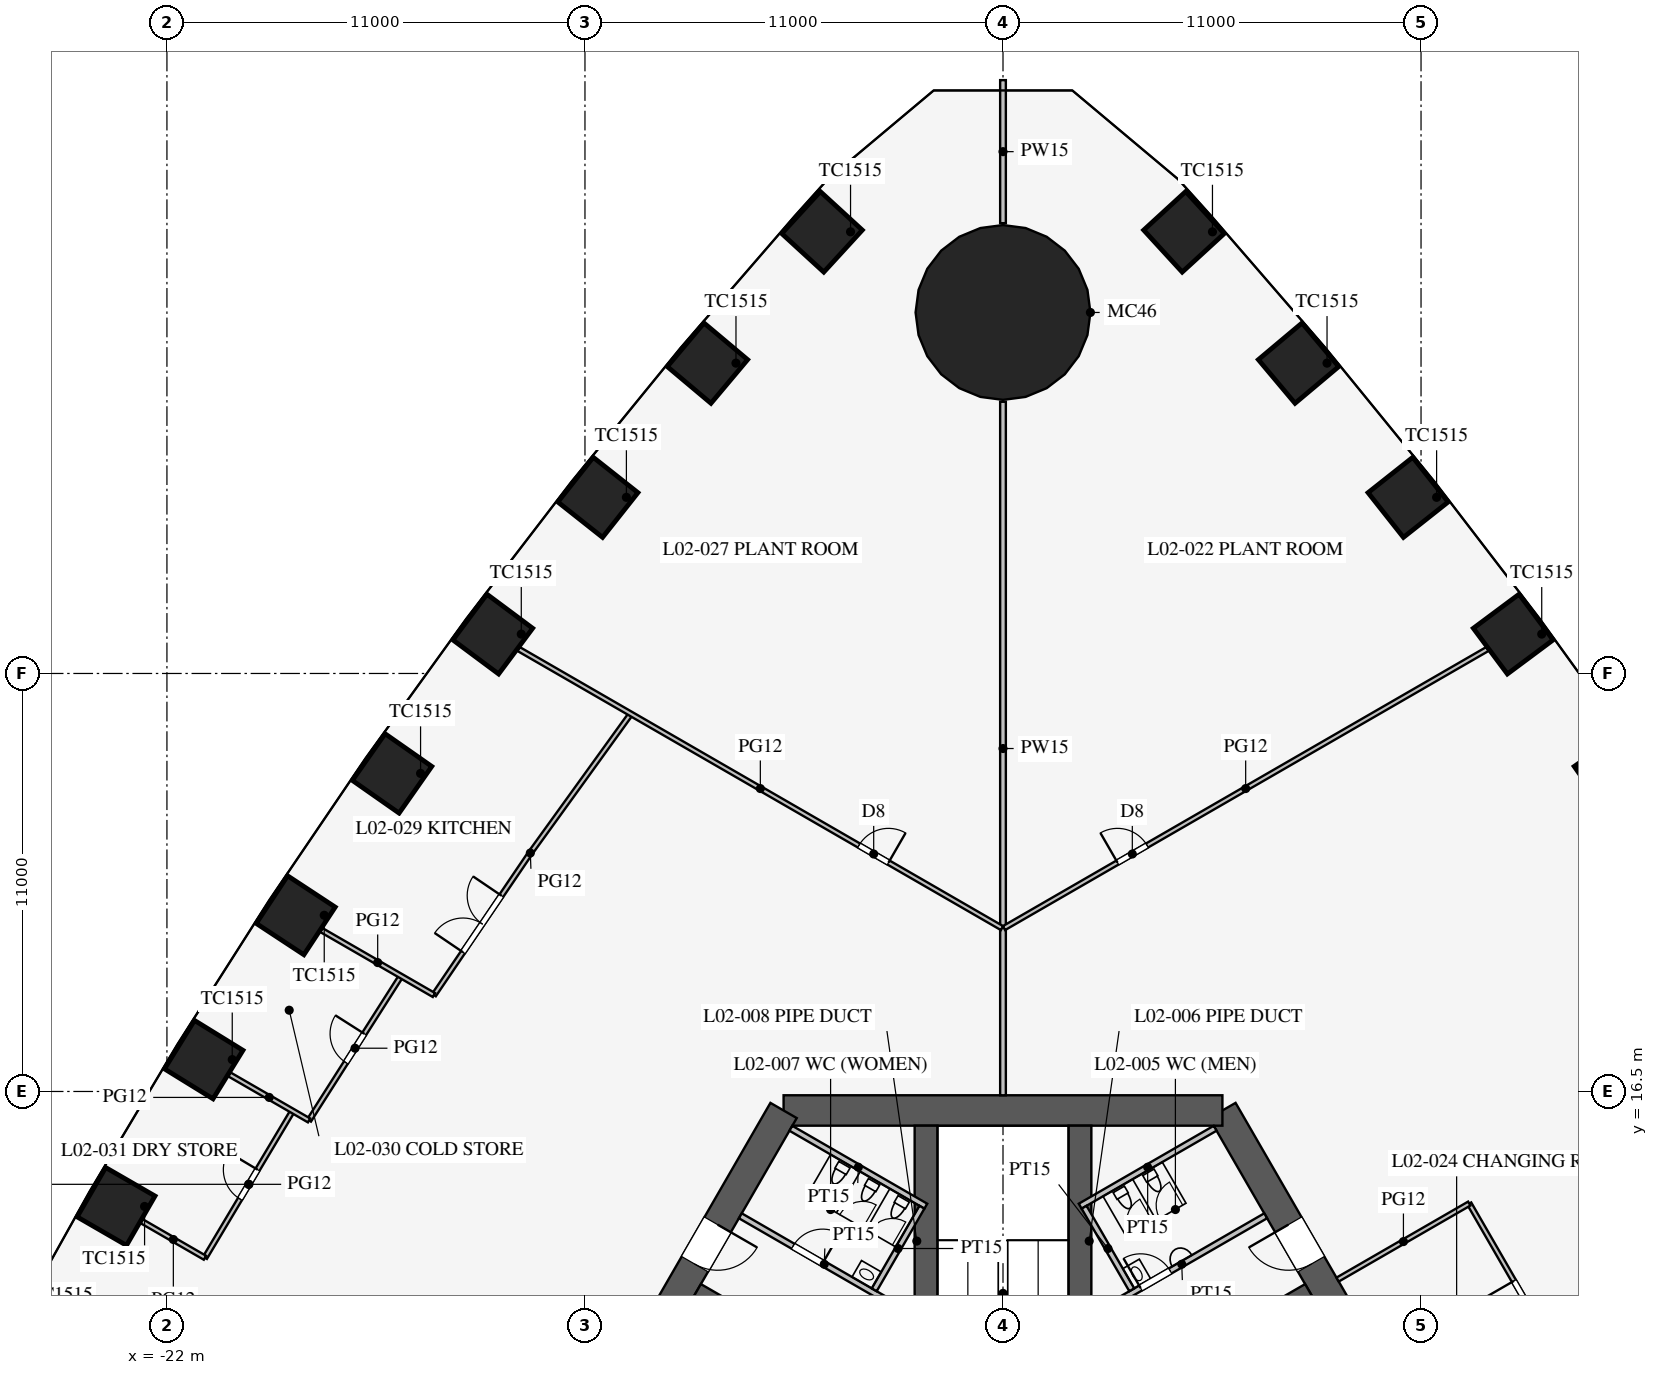
"""IFC4 building model, lengths in metres.
Left out: names, types, materials, properties, quantities, classifications, styles, units other than length and angle.
Written with IfcOpenShell. Run it as: python <this file> out.ifc"""

import sys

from ifc_helpers import new_model, si_unit, direction, frame, frame_2d, origin, origin_2d, place, context, subcontext, project, spatial, rectangle, circle, extrude, element, fill, save


model = new_model("IFC4")
c1 = context("Model", 3, precision=1e-05, world=origin(), true_north=direction((0.0, 1.0)))
c2 = subcontext(c1, "Body", "Model", "MODEL_VIEW")
j1 = project(units=[si_unit("LENGTHUNIT", "METRE"), si_unit("PLANEANGLEUNIT", "RADIAN")], contexts=[c1])
p1 = place(None, origin())
s1 = spatial("IfcSite", under=j1, at=p1, CompositionType="ELEMENT")
p2 = place(p1, origin())
s2 = spatial("IfcBuilding", under=s1, at=p2, CompositionType="ELEMENT")
p3 = place(p2, frame((0.0, 0.0, 11.5)))
s3 = spatial("IfcBuildingStorey", under=s2, at=p3, CompositionType="ELEMENT", Elevation=11.5)
for number, where, z_axis, x_axis in (
    (1, (16.076, 24.87, 0.0), (0.0, 0.0, 1.0), (-0.574, 0.819, 0.0)),
    (2, (13.426, 28.536, 0.0), (0.0, 0.0, 1.0), (-0.597, 0.802, 0.0)),
    (3, (10.66, 32.135, 0.0), (0.0, 0.0, 1.0), (-0.62, 0.784, 0.0)),
    (4, (7.776, 35.667, 0.0), (0.0, 0.0, 1.0), (-0.643, 0.766, 0.0)),
    (5, (4.762, 39.122, 0.0), (0.0, 0.0, 1.0), (-0.676, 0.737, 0.0)),
    (6, (-4.762, 39.122, 0.0), (0.0, 0.0, 1.0), (-0.676, -0.737, 0.0)),
    (7, (-7.776, 35.667, 0.0), (0.0, 0.0, 1.0), (-0.643, -0.766, 0.0)),
    (8, (-10.66, 32.135, 0.0), (0.0, 0.0, 1.0), (-0.62, -0.784, 0.0)),
    (9, (-13.426, 28.536, 0.0), (0.0, 0.0, 1.0), (-0.597, -0.802, 0.0)),
    (10, (-16.076, 24.87, 0.0), (0.0, 0.0, 1.0), (-0.574, -0.819, 0.0)),
    (11, (-18.611, 21.137, 0.0), (0.0, 0.0, 1.0), (-0.549, -0.836, 0.0)),
    (12, (-21.031, 17.339, 0.0), (0.0, 0.0, 1.0), (-0.525, -0.851, 0.0)),
    (13, (-23.338, 13.474, 0.0), (0.0, 0.0, 1.0), (-0.5, -0.866, 0.0)),
):
    element("IfcColumn", number, at=place(p3, frame(where, z_axis=z_axis, x_axis=x_axis)), inside=s3, PredefinedType="COLUMN", context=c2, shape_type="SweptSolid", body=[
        extrude(rectangle(XDim=1.5, YDim=1.5, at=origin_2d()), origin(), (0.0, 0.0, 1.0), 5.0),
    ])
p4 = place(p3, frame((0.0, 37.0, 0.0), z_axis=(0.0, 0.0, 1.0), x_axis=(1.0, 0.0, 0.0)))
e14 = element("IfcColumn", 14, at=p4, inside=s3, PredefinedType="COLUMN", context=c2, shape_type="SweptSolid", body=[
    extrude(circle(Radius=2.3, at=origin_2d()), origin(), (0.0, 0.0, 1.0), 5.0),
])
p5 = place(p3, frame((16.743, -3.0, 0.0), z_axis=(0.0, 0.0, 1.0), x_axis=(-0.500002442456, 0.866023993627, 0.0)))
e15 = element("IfcWall", 15, at=p5, inside=s3, PredefinedType="SHEAR", context=c2, shape_type="SweptSolid", body=[
    extrude(rectangle(XDim=21.939, YDim=0.8, at=frame_2d((10.97, 0.0))), origin(), (0.0, 0.0, 1.0), 5.0),
])
p6 = place(p5, frame((17.27, 0.0, 0.0)))
e16 = element("IfcOpeningElement", 16, at=p6, cuts=e15, PredefinedType="OPENING", context=c2, shape_type="SweptSolid", body=[
    extrude(rectangle(XDim=1.2, YDim=2.1, at=frame_2d((0.6, 1.05))), frame((0.0, 0.41, 0.0), z_axis=(0.0, -1.0, 0.0), x_axis=(1.0, 0.0, 0.0)), (0.0, 0.0, 1.0), 0.82),
])
p7 = place(p5, frame((3.47, 0.0, 0.0)))
e17 = element("IfcOpeningElement", 17, at=p7, cuts=e15, PredefinedType="OPENING", context=c2, shape_type="SweptSolid", body=[
    extrude(rectangle(XDim=1.2, YDim=2.1, at=frame_2d((0.6, 1.05))), frame((0.0, 0.41, 0.0), z_axis=(0.0, -1.0, 0.0), x_axis=(1.0, 0.0, 0.0)), (0.0, 0.0, 1.0), 0.82),
])
p8 = place(p3, frame((5.773, 16.0, 0.0), z_axis=(0.0, 0.0, 1.0), x_axis=(-1.0, 0.0, 0.0)))
e18 = element("IfcWall", 18, at=p8, inside=s3, PredefinedType="SHEAR", context=c2, shape_type="SweptSolid", body=[
    extrude(rectangle(XDim=11.547, YDim=0.8, at=frame_2d((5.773, 0.0))), origin(), (0.0, 0.0, 1.0), 5.0),
])
p9 = place(p3, frame((-5.773, 16.0, 0.0), z_axis=(0.0, 0.0, 1.0), x_axis=(-0.500002442456, -0.866023993627, 0.0)))
e19 = element("IfcWall", 19, at=p9, inside=s3, PredefinedType="SHEAR", context=c2, shape_type="SweptSolid", body=[
    extrude(rectangle(XDim=21.939, YDim=0.8, at=frame_2d((10.97, 0.0))), origin(), (0.0, 0.0, 1.0), 5.0),
])
p10 = place(p9, frame((17.27, 0.0, 0.0)))
e20 = element("IfcOpeningElement", 20, at=p10, cuts=e19, PredefinedType="OPENING", context=c2, shape_type="SweptSolid", body=[
    extrude(rectangle(XDim=1.2, YDim=2.1, at=frame_2d((0.6, 1.05))), frame((0.0, 0.41, 0.0), z_axis=(0.0, -1.0, 0.0), x_axis=(1.0, 0.0, 0.0)), (0.0, 0.0, 1.0), 0.82),
])
p11 = place(p9, frame((3.47, 0.0, 0.0)))
e21 = element("IfcOpeningElement", 21, at=p11, cuts=e19, PredefinedType="OPENING", context=c2, shape_type="SweptSolid", body=[
    extrude(rectangle(XDim=1.2, YDim=2.1, at=frame_2d((0.6, 1.05))), frame((0.0, 0.41, 0.0), z_axis=(0.0, -1.0, 0.0), x_axis=(1.0, 0.0, 0.0)), (0.0, 0.0, 1.0), 0.82),
])
for number, where, z_axis, x_axis in (
    (22, (5.832, 9.949, 0.0), (0.0, 0.0, 1.0), (0.866, 0.5, 0.0)),
    (23, (-5.832, 9.949, 0.0), (0.0, 0.0, 1.0), (-0.866, 0.5, 0.0)),
):
    element("IfcWall", number, at=place(p3, frame(where, z_axis=z_axis, x_axis=x_axis)), inside=s3, PredefinedType="SHEAR", context=c2, shape_type="SweptSolid", body=[
        extrude(rectangle(XDim=2.575, YDim=0.45, at=frame_2d((1.288, 0.0))), origin(), (0.0, 0.0, 1.0), 5.0),
    ])
for number, where, z_axis, x_axis in (
    (24, (2.025, 6.525, 0.0), (0.0, 0.0, 1.0), (0.0, 1.0, 0.0)),
    (25, (-2.025, 6.525, 0.0), (0.0, 0.0, 1.0), (0.0, 1.0, 0.0)),
):
    element("IfcWall", number, at=place(p3, frame(where, z_axis=z_axis, x_axis=x_axis)), inside=s3, PredefinedType="SHEAR", context=c2, shape_type="SweptSolid", body=[
        extrude(rectangle(XDim=9.075, YDim=0.6, at=frame_2d((4.538, 0.0))), origin(), (0.0, 0.0, 1.0), 5.0),
    ])
p12 = place(p3, frame((2.495, 10.678, 0.0), z_axis=(0.0, 0.0, 1.0), x_axis=(0.86602216432, 0.500005610874, 0.0)))
e26 = element("IfcWall", 26, at=p12, inside=s3, PredefinedType="PARTITIONING", context=c2, shape_type="SweptSolid", body=[
    extrude(rectangle(XDim=5.1, YDim=0.15, at=frame_2d((2.55, 0.0))), origin(), (0.0, 0.0, 1.0), 4.8),
])
p13 = place(p12, frame((1.3, 0.0, 0.0)))
e27 = element("IfcOpeningElement", 27, at=p13, cuts=e26, PredefinedType="OPENING", context=c2, shape_type="SweptSolid", body=[
    extrude(rectangle(XDim=0.9, YDim=2.1, at=frame_2d((0.45, 1.05))), frame((0.0, 0.085, 0.0), z_axis=(0.0, -1.0, 0.0), x_axis=(1.0, 0.0, 0.0)), (0.0, 0.0, 1.0), 0.17),
])
p14 = place(p3, frame((-2.495, 10.678, 0.0), z_axis=(0.0, 0.0, 1.0), x_axis=(-0.86602216432, 0.500005610874, 0.0)))
e28 = element("IfcWall", 28, at=p14, inside=s3, PredefinedType="PARTITIONING", context=c2, shape_type="SweptSolid", body=[
    extrude(rectangle(XDim=5.1, YDim=0.15, at=frame_2d((2.55, 0.0))), origin(), (0.0, 0.0, 1.0), 4.8),
])
p15 = place(p14, frame((2.6, 0.0, 0.0)))
e29 = element("IfcOpeningElement", 29, at=p15, cuts=e28, PredefinedType="OPENING", context=c2, shape_type="SweptSolid", body=[
    extrude(rectangle(XDim=0.9, YDim=2.1, at=frame_2d((0.45, 1.05))), frame((0.0, 0.085, 0.0), z_axis=(0.0, -1.0, 0.0), x_axis=(1.0, 0.0, 0.0)), (0.0, 0.0, 1.0), 0.17),
])
p16 = place(p3, frame((2.031, 13.482, 0.0), z_axis=(0.0, 0.0, 1.0), x_axis=(0.866050731258, 0.499956128963, 0.0)))
e30 = element("IfcWall", 30, at=p16, inside=s3, PredefinedType="PARTITIONING", context=c2, shape_type="SweptSolid", body=[
    extrude(rectangle(XDim=4.1, YDim=0.15, at=frame_2d((2.05, 0.0))), origin(), (0.0, 0.0, 1.0), 4.8),
])
p17 = place(p3, frame((3.389, 11.281, 0.0), z_axis=(0.0, 0.0, 1.0), x_axis=(-0.499989096993, 0.866031698547, 0.0)))
e31 = element("IfcWall", 31, at=p17, inside=s3, PredefinedType="PARTITIONING", context=c2, shape_type="SweptSolid", body=[
    extrude(rectangle(XDim=2.51, YDim=0.15, at=frame_2d((1.255, 0.0))), origin(), (0.0, 0.0, 1.0), 4.8),
])
p18 = place(p3, frame((-2.031, 13.482, 0.0), z_axis=(0.0, 0.0, 1.0), x_axis=(-0.866050731258, 0.499956128963, 0.0)))
e32 = element("IfcWall", 32, at=p18, inside=s3, PredefinedType="PARTITIONING", context=c2, shape_type="SweptSolid", body=[
    extrude(rectangle(XDim=4.1, YDim=0.15, at=frame_2d((2.05, 0.0))), origin(), (0.0, 0.0, 1.0), 4.8),
])
p19 = place(p3, frame((-3.389, 11.281, 0.0), z_axis=(0.0, 0.0, 1.0), x_axis=(0.499989096993, 0.866031698547, 0.0)))
e33 = element("IfcWall", 33, at=p19, inside=s3, PredefinedType="PARTITIONING", context=c2, shape_type="SweptSolid", body=[
    extrude(rectangle(XDim=2.51, YDim=0.15, at=frame_2d((1.255, 0.0))), origin(), (0.0, 0.0, 1.0), 4.8),
])
p20 = place(p3, frame((0.0, 16.4, 0.0), z_axis=(0.0, 0.0, 1.0), x_axis=(0.0, 1.0, 0.0)))
e34 = element("IfcWall", 34, at=p20, inside=s3, PredefinedType="PARTITIONING", context=c2, shape_type="SweptSolid", body=[
    extrude(rectangle(XDim=18.25, YDim=0.15, at=frame_2d((9.125, 0.0))), origin(), (0.0, 0.0, 1.0), 3.1),
])
p21 = place(p3, frame((0.0, 39.35, 0.0), z_axis=(0.0, 0.0, 1.0), x_axis=(0.0, 1.0, 0.0)))
e35 = element("IfcWall", 35, at=p21, inside=s3, PredefinedType="PARTITIONING", context=c2, shape_type="SweptSolid", body=[
    extrude(rectangle(XDim=3.764, YDim=0.15, at=frame_2d((1.882, 0.0))), origin(), (0.0, 0.0, 1.0), 3.1),
])
p22 = place(p3, frame((15.069, 8.7, 0.0), z_axis=(0.0, 0.0, 1.0), x_axis=(-0.49999793692, 0.866026594901, 0.0)))
e36 = element("IfcWall", 36, at=p22, inside=s3, PredefinedType="PARTITIONING", context=c2, shape_type="SweptSolid", body=[
    extrude(rectangle(XDim=5.6, YDim=0.12, at=frame_2d((2.8, 0.0))), origin(), (0.0, 0.0, 1.0), 3.6),
])
p23 = place(p22, frame((2.35, 0.0, 0.0)))
e37 = element("IfcOpeningElement", 37, at=p23, cuts=e36, PredefinedType="OPENING", context=c2, shape_type="SweptSolid", body=[
    extrude(rectangle(XDim=0.9, YDim=2.1, at=frame_2d((0.45, 1.05))), frame((0.0, 0.07, 0.0), z_axis=(0.0, -1.0, 0.0), x_axis=(1.0, 0.0, 0.0)), (0.0, 0.0, 1.0), 0.14),
])
p24 = place(p3, frame((8.805, 11.55, 0.0), z_axis=(0.0, 0.0, 1.0), x_axis=(0.866026010844, 0.49999894854, 0.0)))
e38 = element("IfcWall", 38, at=p24, inside=s3, PredefinedType="PARTITIONING", context=c2, shape_type="SweptSolid", body=[
    extrude(rectangle(XDim=4.0, YDim=0.12, at=frame_2d((2.0, 0.0))), origin(), (0.0, 0.0, 1.0), 3.6),
])
p25 = place(p3, frame((0.025, 20.799, 0.0), z_axis=(0.0, 0.0, 1.0), x_axis=(0.866027263711, 0.4999967785, 0.0)))
e39 = element("IfcWall", 39, at=p25, inside=s3, PredefinedType="PARTITIONING", context=c2, shape_type="SweptSolid", body=[
    extrude(rectangle(XDim=14.688, YDim=0.12, at=frame_2d((7.344, 0.0))), origin(), (0.0, 0.0, 1.0), 3.6),
])
p26 = place(p25, frame((3.45, 0.0, 0.0)))
e40 = element("IfcOpeningElement", 40, at=p26, cuts=e39, PredefinedType="OPENING", context=c2, shape_type="SweptSolid", body=[
    extrude(rectangle(XDim=0.9, YDim=2.1, at=frame_2d((0.45, 1.05))), frame((0.0, 0.07, 0.0), z_axis=(0.0, -1.0, 0.0), x_axis=(1.0, 0.0, 0.0)), (0.0, 0.0, 1.0), 0.14),
])
p27 = place(p3, frame((-12.441, 22.771, 0.0), z_axis=(0.0, 0.0, 1.0), x_axis=(-0.561512004239, -0.827468591002, 0.0)))
e41 = element("IfcWall", 41, at=p27, inside=s3, PredefinedType="PARTITIONING", context=c2, shape_type="SweptSolid", body=[
    extrude(rectangle(XDim=4.512, YDim=0.12, at=frame_2d((2.256, 0.0))), origin(), (0.0, 0.0, 1.0), 3.6),
])
p28 = place(p27, frame((1.35, 0.0, 0.0)))
e42 = element("IfcOpeningElement", 42, at=p28, cuts=e41, PredefinedType="OPENING", context=c2, shape_type="SweptSolid", body=[
    extrude(rectangle(XDim=1.8, YDim=2.1, at=frame_2d((0.9, 1.05))), frame((0.0, 0.07, 0.0), z_axis=(0.0, -1.0, 0.0), x_axis=(1.0, 0.0, 0.0)), (0.0, 0.0, 1.0), 0.14),
])
p29 = place(p3, frame((-9.793, 26.439, 0.0), z_axis=(0.0, 0.0, 1.0), x_axis=(-0.585376255171, -0.810761765183, 0.0)))
e43 = element("IfcWall", 43, at=p29, inside=s3, PredefinedType="PARTITIONING", context=c2, shape_type="SweptSolid", body=[
    extrude(rectangle(XDim=4.523, YDim=0.12, at=frame_2d((2.262, 0.0))), origin(), (0.0, 0.0, 1.0), 3.6),
])
p30 = place(p3, frame((-18.693, 15.989, 0.0), z_axis=(0.0, 0.0, 1.0), x_axis=(-0.51252396108, -0.858672923364, 0.0)))
e44 = element("IfcWall", 44, at=p30, inside=s3, PredefinedType="PARTITIONING", context=c2, shape_type="SweptSolid", body=[
    extrude(rectangle(XDim=4.5, YDim=0.12, at=frame_2d((2.25, 0.0))), origin(), (0.0, 0.0, 1.0), 3.6),
])
p31 = place(p30, frame((1.8, 0.0, 0.0)))
e45 = element("IfcOpeningElement", 45, at=p31, cuts=e44, PredefinedType="OPENING", context=c2, shape_type="SweptSolid", body=[
    extrude(rectangle(XDim=0.9, YDim=2.1, at=frame_2d((0.45, 1.05))), frame((0.0, 0.07, 0.0), z_axis=(0.0, -1.0, 0.0), x_axis=(1.0, 0.0, 0.0)), (0.0, 0.0, 1.0), 0.14),
])
p32 = place(p3, frame((-15.841, 19.538, 0.0), z_axis=(0.0, 0.0, 1.0), x_axis=(-0.537243691336, -0.843427066272, 0.0)))
e46 = element("IfcWall", 46, at=p32, inside=s3, PredefinedType="PARTITIONING", context=c2, shape_type="SweptSolid", body=[
    extrude(rectangle(XDim=4.504, YDim=0.12, at=frame_2d((2.252, 0.0))), origin(), (0.0, 0.0, 1.0), 3.6),
])
p33 = place(p32, frame((1.8, 0.0, 0.0)))
e47 = element("IfcOpeningElement", 47, at=p33, cuts=e46, PredefinedType="OPENING", context=c2, shape_type="SweptSolid", body=[
    extrude(rectangle(XDim=0.9, YDim=2.1, at=frame_2d((0.45, 1.05))), frame((0.0, 0.07, 0.0), z_axis=(0.0, -1.0, 0.0), x_axis=(1.0, 0.0, 0.0)), (0.0, 0.0, 1.0), 0.14),
])
p34 = place(p3, frame((-21.0, 12.124, 0.0), z_axis=(0.0, 0.0, 1.0), x_axis=(-0.865988661894, 0.500063633421, 0.0)))
e48 = element("IfcWall", 48, at=p34, inside=s3, PredefinedType="PARTITIONING", context=c2, shape_type="SweptSolid", body=[
    extrude(rectangle(XDim=1.92, YDim=0.12, at=frame_2d((0.96, 0.0))), origin(), (0.0, 0.0, 1.0), 3.6),
])
p35 = place(p3, frame((-0.025, 20.799, 0.0), z_axis=(0.0, 0.0, 1.0), x_axis=(-0.866027263711, 0.4999967785, 0.0)))
e49 = element("IfcWall", 49, at=p35, inside=s3, PredefinedType="PARTITIONING", context=c2, shape_type="SweptSolid", body=[
    extrude(rectangle(XDim=14.688, YDim=0.12, at=frame_2d((7.344, 0.0))), origin(), (0.0, 0.0, 1.0), 3.6),
])
p36 = place(p35, frame((3.45, 0.0, 0.0)))
e50 = element("IfcOpeningElement", 50, at=p36, cuts=e49, PredefinedType="OPENING", context=c2, shape_type="SweptSolid", body=[
    extrude(rectangle(XDim=0.9, YDim=2.1, at=frame_2d((0.45, 1.05))), frame((0.0, 0.07, 0.0), z_axis=(0.0, -1.0, 0.0), x_axis=(1.0, 0.0, 0.0)), (0.0, 0.0, 1.0), 0.14),
])
p37 = place(p3, frame((-18.26, 15.739, 0.0), z_axis=(0.0, 0.0, 1.0), x_axis=(-0.866017538894, 0.500013622142, 0.0)))
e51 = element("IfcWall", 51, at=p37, inside=s3, PredefinedType="PARTITIONING", context=c2, shape_type="SweptSolid", body=[
    extrude(rectangle(XDim=2.419, YDim=0.12, at=frame_2d((1.21, 0.0))), origin(), (0.0, 0.0, 1.0), 3.6),
])
p38 = place(p3, frame((-14.975, 19.038, 0.0), z_axis=(0.0, 0.0, 1.0), x_axis=(-0.866014265796, 0.500019291066, 0.0)))
e52 = element("IfcWall", 52, at=p38, inside=s3, PredefinedType="PARTITIONING", context=c2, shape_type="SweptSolid", body=[
    extrude(rectangle(XDim=3.417, YDim=0.12, at=frame_2d((1.708, 0.0))), origin(), (0.0, 0.0, 1.0), 3.6),
])
p39 = place(p13, origin())
e53 = element("IfcDoor", 53, at=p39, inside=s3, OperationType="SINGLE_SWING_LEFT", PredefinedType="DOOR", context=c2, shape_type="SweptSolid", body=[
    extrude(rectangle(XDim=0.9, YDim=2.1, at=frame_2d((0.45, 1.05))), frame((0.0, 0.025, 0.0), z_axis=(0.0, -1.0, 0.0), x_axis=(1.0, 0.0, 0.0)), (0.0, 0.0, 1.0), 0.05),
])
fill(e27, e53)
p40 = place(p15, frame((0.9, 0.0, 0.0), z_axis=(0.0, 0.0, 1.0), x_axis=(-1.0, 0.0, 0.0)))
e54 = element("IfcDoor", 54, at=p40, inside=s3, OperationType="SINGLE_SWING_RIGHT", PredefinedType="DOOR", context=c2, shape_type="SweptSolid", body=[
    extrude(rectangle(XDim=0.9, YDim=2.1, at=frame_2d((0.45, 1.05))), frame((0.0, 0.025, 0.0), z_axis=(0.0, -1.0, 0.0), x_axis=(1.0, 0.0, 0.0)), (0.0, 0.0, 1.0), 0.05),
])
fill(e29, e54)
p41 = place(p6, origin())
e55 = element("IfcDoor", 55, at=p41, inside=s3, OperationType="SINGLE_SWING_RIGHT", PredefinedType="DOOR", context=c2, shape_type="SweptSolid", body=[
    extrude(rectangle(XDim=1.2, YDim=2.1, at=frame_2d((0.6, 1.05))), frame((0.0, 0.025, 0.0), z_axis=(0.0, -1.0, 0.0), x_axis=(1.0, 0.0, 0.0)), (0.0, 0.0, 1.0), 0.05),
])
fill(e16, e55)
p42 = place(p11, origin())
e56 = element("IfcDoor", 56, at=p42, inside=s3, OperationType="SINGLE_SWING_LEFT", PredefinedType="DOOR", context=c2, shape_type="SweptSolid", body=[
    extrude(rectangle(XDim=1.2, YDim=2.1, at=frame_2d((0.6, 1.05))), frame((0.0, 0.025, 0.0), z_axis=(0.0, -1.0, 0.0), x_axis=(1.0, 0.0, 0.0)), (0.0, 0.0, 1.0), 0.05),
])
fill(e21, e56)
p43 = place(p26, origin())
e57 = element("IfcDoor", 57, at=p43, inside=s3, OperationType="SINGLE_SWING_LEFT", PredefinedType="DOOR", context=c2, shape_type="SweptSolid", body=[
    extrude(rectangle(XDim=0.9, YDim=2.1, at=frame_2d((0.45, 1.05))), frame((0.0, 0.025, 0.0), z_axis=(0.0, -1.0, 0.0), x_axis=(1.0, 0.0, 0.0)), (0.0, 0.0, 1.0), 0.05),
])
fill(e40, e57)
p44 = place(p23, origin())
e58 = element("IfcDoor", 58, at=p44, inside=s3, OperationType="SINGLE_SWING_RIGHT", PredefinedType="DOOR", context=c2, shape_type="SweptSolid", body=[
    extrude(rectangle(XDim=0.9, YDim=2.1, at=frame_2d((0.45, 1.05))), frame((0.0, 0.025, 0.0), z_axis=(0.0, -1.0, 0.0), x_axis=(1.0, 0.0, 0.0)), (0.0, 0.0, 1.0), 0.05),
])
fill(e37, e58)
p45 = place(p36, frame((0.9, 0.0, 0.0), z_axis=(0.0, 0.0, 1.0), x_axis=(-1.0, 0.0, 0.0)))
e59 = element("IfcDoor", 59, at=p45, inside=s3, OperationType="SINGLE_SWING_RIGHT", PredefinedType="DOOR", context=c2, shape_type="SweptSolid", body=[
    extrude(rectangle(XDim=0.9, YDim=2.1, at=frame_2d((0.45, 1.05))), frame((0.0, 0.025, 0.0), z_axis=(0.0, -1.0, 0.0), x_axis=(1.0, 0.0, 0.0)), (0.0, 0.0, 1.0), 0.05),
])
fill(e50, e59)
p46 = place(p28, frame((1.8, 0.0, 0.0), z_axis=(0.0, 0.0, 1.0), x_axis=(-1.0, 0.0, 0.0)))
e60 = element("IfcDoor", 60, at=p46, inside=s3, OperationType="DOUBLE_DOOR_SINGLE_SWING", PredefinedType="DOOR", context=c2, shape_type="SweptSolid", body=[
    extrude(rectangle(XDim=1.8, YDim=2.1, at=frame_2d((0.9, 1.05))), frame((0.0, 0.025, 0.0), z_axis=(0.0, -1.0, 0.0), x_axis=(1.0, 0.0, 0.0)), (0.0, 0.0, 1.0), 0.05),
])
fill(e42, e60)
p47 = place(p33, frame((0.9, 0.0, 0.0), z_axis=(0.0, 0.0, 1.0), x_axis=(-1.0, 0.0, 0.0)))
e61 = element("IfcDoor", 61, at=p47, inside=s3, OperationType="SINGLE_SWING_RIGHT", PredefinedType="DOOR", context=c2, shape_type="SweptSolid", body=[
    extrude(rectangle(XDim=0.9, YDim=2.1, at=frame_2d((0.45, 1.05))), frame((0.0, 0.025, 0.0), z_axis=(0.0, -1.0, 0.0), x_axis=(1.0, 0.0, 0.0)), (0.0, 0.0, 1.0), 0.05),
])
fill(e47, e61)
p48 = place(p31, frame((0.9, 0.0, 0.0), z_axis=(0.0, 0.0, 1.0), x_axis=(-1.0, 0.0, 0.0)))
e62 = element("IfcDoor", 62, at=p48, inside=s3, OperationType="SINGLE_SWING_RIGHT", PredefinedType="DOOR", context=c2, shape_type="SweptSolid", body=[
    extrude(rectangle(XDim=0.9, YDim=2.1, at=frame_2d((0.45, 1.05))), frame((0.0, 0.025, 0.0), z_axis=(0.0, -1.0, 0.0), x_axis=(1.0, 0.0, 0.0)), (0.0, 0.0, 1.0), 0.05),
])
fill(e45, e62)
save(model, sys.argv[1])
